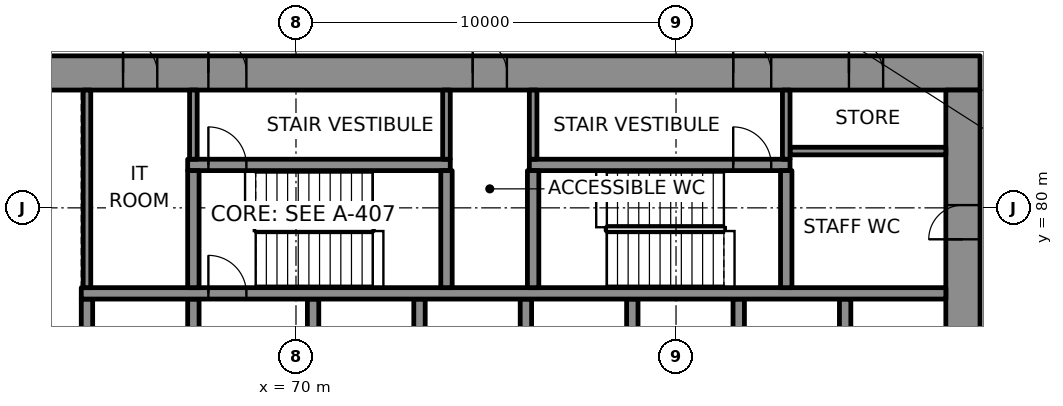
"""IFC4 building model, lengths in metres.
Left out: names, types, materials, properties, quantities, classifications, styles, units other than length and angle.
Written with IfcOpenShell. Run it as: python <this file> out.ifc"""

import sys

from ifc_helpers import new_model, si_unit, direction, frame, frame_2d, origin, place, context, subcontext, project, spatial, rectangle, extrude, element, fill, save


model = new_model("IFC4")
c1 = context("Model", 3, precision=1e-05, world=origin(), true_north=direction((0.0, 1.0)))
c2 = subcontext(c1, "Body", "Model", "MODEL_VIEW")
j1 = project(units=[si_unit("LENGTHUNIT", "METRE"), si_unit("PLANEANGLEUNIT", "RADIAN")], contexts=[c1])
p1 = place(None, origin())
s1 = spatial("IfcSite", under=j1, at=p1, CompositionType="ELEMENT")
p2 = place(p1, origin())
s2 = spatial("IfcBuilding", under=s1, at=p2, CompositionType="ELEMENT")
p3 = place(p2, frame((0.0, 0.0, 94.6)))
s3 = spatial("IfcBuildingStorey", under=s2, at=p3, CompositionType="ELEMENT", Elevation=94.6)
p4 = place(p3, frame((62.0, 83.55, 0.0), z_axis=(0.0, 0.0, 1.0), x_axis=(1.0, 0.0, 0.0)))
e1 = element("IfcWall", 1, at=p4, inside=s3, PredefinedType="SHEAR", context=c2, shape_type="SweptSolid", body=[
    extrude(rectangle(XDim=26.0, YDim=0.9, at=frame_2d((13.0, 0.0))), origin(), (0.0, 0.0, 1.0), 4.0),
])
p5 = place(p4, frame((5.695, 0.0, 0.0)))
e2 = element("IfcOpeningElement", 2, at=p5, cuts=e1, PredefinedType="OPENING", context=c2, shape_type="SweptSolid", body=[
    extrude(rectangle(XDim=1.0, YDim=2.1, at=frame_2d((0.5, 1.05))), frame((0.0, 0.46, 0.0), z_axis=(0.0, -1.0, 0.0), x_axis=(1.0, 0.0, 0.0)), (0.0, 0.0, 1.0), 0.92),
])
p6 = place(p4, frame((19.505, 0.0, 0.0)))
e3 = element("IfcOpeningElement", 3, at=p6, cuts=e1, PredefinedType="OPENING", context=c2, shape_type="SweptSolid", body=[
    extrude(rectangle(XDim=1.0, YDim=2.1, at=frame_2d((0.5, 1.05))), frame((0.0, 0.46, 0.0), z_axis=(0.0, -1.0, 0.0), x_axis=(1.0, 0.0, 0.0)), (0.0, 0.0, 1.0), 0.92),
])
p7 = place(p4, frame((3.45, 0.0, 0.0)))
e4 = element("IfcOpeningElement", 4, at=p7, cuts=e1, PredefinedType="OPENING", context=c2, shape_type="SweptSolid", body=[
    extrude(rectangle(XDim=0.9, YDim=2.1, at=frame_2d((0.45, 1.05))), frame((0.0, 0.46, 0.0), z_axis=(0.0, -1.0, 0.0), x_axis=(1.0, 0.0, 0.0)), (0.0, 0.0, 1.0), 0.92),
])
p8 = place(p4, frame((12.65, 0.0, 0.0)))
e5 = element("IfcOpeningElement", 5, at=p8, cuts=e1, PredefinedType="OPENING", context=c2, shape_type="SweptSolid", body=[
    extrude(rectangle(XDim=0.9, YDim=2.1, at=frame_2d((0.45, 1.05))), frame((0.0, 0.46, 0.0), z_axis=(0.0, -1.0, 0.0), x_axis=(1.0, 0.0, 0.0)), (0.0, 0.0, 1.0), 0.92),
])
p9 = place(p4, frame((22.55, 0.0, 0.0)))
e6 = element("IfcOpeningElement", 6, at=p9, cuts=e1, PredefinedType="OPENING", context=c2, shape_type="SweptSolid", body=[
    extrude(rectangle(XDim=0.9, YDim=2.1, at=frame_2d((0.45, 1.05))), frame((0.0, 0.46, 0.0), z_axis=(0.0, -1.0, 0.0), x_axis=(1.0, 0.0, 0.0)), (0.0, 0.0, 1.0), 0.92),
])
p10 = place(p3, frame((87.55, 66.9, 0.0), z_axis=(0.0, 0.0, 1.0), x_axis=(0.0, 1.0, 0.0)))
e7 = element("IfcWall", 7, at=p10, inside=s3, PredefinedType="SHEAR", context=c2, shape_type="SweptSolid", body=[
    extrude(rectangle(XDim=16.2, YDim=0.9, at=frame_2d((8.1, 0.0))), origin(), (0.0, 0.0, 1.0), 4.0),
])
p11 = place(p10, frame((5.5, 0.0, 0.0)))
e8 = element("IfcOpeningElement", 8, at=p11, cuts=e7, PredefinedType="OPENING", context=c2, shape_type="SweptSolid", body=[
    extrude(rectangle(XDim=1.8, YDim=2.1, at=frame_2d((0.9, 1.05))), frame((0.0, 0.46, 0.0), z_axis=(0.0, -1.0, 0.0), x_axis=(1.0, 0.0, 0.0)), (0.0, 0.0, 1.0), 0.92),
])
p12 = place(p10, frame((12.272, 0.0, 0.0)))
e9 = element("IfcOpeningElement", 9, at=p12, cuts=e7, PredefinedType="OPENING", context=c2, shape_type="SweptSolid", body=[
    extrude(rectangle(XDim=0.9, YDim=2.1, at=frame_2d((0.45, 1.05))), frame((0.0, 0.46, 0.0), z_axis=(0.0, -1.0, 0.0), x_axis=(1.0, 0.0, 0.0)), (0.0, 0.0, 1.0), 0.92),
])
for number, where, z_axis, x_axis in (
    (10, (64.5, 75.0, 0.0), (0.0, 0.0, 1.0), (0.0, 1.0, 0.0)),
    (11, (67.3, 75.0, 0.0), (0.0, 0.0, 1.0), (0.0, 1.0, 0.0)),
):
    element("IfcWall", number, at=place(p3, frame(where, z_axis=z_axis, x_axis=x_axis)), inside=s3, PredefinedType="SHEAR", context=c2, shape_type="SweptSolid", body=[
        extrude(rectangle(XDim=2.6, YDim=0.3, at=frame_2d((1.3, 0.0))), origin(), (0.0, 0.0, 1.0), 4.0),
    ])
p13 = place(p3, frame((70.45, 75.0, 0.0), z_axis=(0.0, 0.0, 1.0), x_axis=(0.0, 1.0, 0.0)))
e12 = element("IfcWall", 12, at=p13, inside=s3, PredefinedType="SHEAR", context=c2, shape_type="SweptSolid", body=[
    extrude(rectangle(XDim=2.6, YDim=0.3, at=frame_2d((1.3, 0.0))), origin(), (0.0, 0.0, 1.0), 4.0),
])
p14 = place(p13, frame((0.15, 0.0, 0.0)))
e13 = element("IfcOpeningElement", 13, at=p14, cuts=e12, PredefinedType="OPENING", context=c2, shape_type="SweptSolid", body=[
    extrude(rectangle(XDim=1.1, YDim=2.1, at=frame_2d((0.55, 1.05))), frame((0.0, 0.16, 0.0), z_axis=(0.0, -1.0, 0.0), x_axis=(1.0, 0.0, 0.0)), (0.0, 0.0, 1.0), 0.32),
])
for number, where, z_axis, x_axis in (
    (14, (73.25, 75.0, 0.0), (0.0, 0.0, 1.0), (0.0, 1.0, 0.0)),
    (15, (76.05, 75.0, 0.0), (0.0, 0.0, 1.0), (0.0, 1.0, 0.0)),
    (16, (78.85, 75.0, 0.0), (0.0, 0.0, 1.0), (0.0, 1.0, 0.0)),
    (17, (81.65, 75.0, 0.0), (0.0, 0.0, 1.0), (0.0, 1.0, 0.0)),
    (18, (84.45, 75.0, 0.0), (0.0, 0.0, 1.0), (0.0, 1.0, 0.0)),
):
    element("IfcWall", number, at=place(p3, frame(where, z_axis=z_axis, x_axis=x_axis)), inside=s3, PredefinedType="SHEAR", context=c2, shape_type="SweptSolid", body=[
        extrude(rectangle(XDim=2.6, YDim=0.3, at=frame_2d((1.3, 0.0))), origin(), (0.0, 0.0, 1.0), 4.0),
    ])
p15 = place(p3, frame((64.35, 77.75, 0.0), z_axis=(0.0, 0.0, 1.0), x_axis=(1.0, 0.0, 0.0)))
e19 = element("IfcWall", 19, at=p15, inside=s3, PredefinedType="SHEAR", context=c2, shape_type="SweptSolid", body=[
    extrude(rectangle(XDim=22.75, YDim=0.3, at=frame_2d((11.375, 0.0))), origin(), (0.0, 0.0, 1.0), 4.0),
])
p16 = place(p15, frame((3.345, 0.0, 0.0)))
e20 = element("IfcOpeningElement", 20, at=p16, cuts=e19, PredefinedType="OPENING", context=c2, shape_type="SweptSolid", body=[
    extrude(rectangle(XDim=1.0, YDim=2.1, at=frame_2d((0.5, 1.05))), frame((0.0, 0.16, 0.0), z_axis=(0.0, -1.0, 0.0), x_axis=(1.0, 0.0, 0.0)), (0.0, 0.0, 1.0), 0.32),
])
p17 = place(p3, frame((67.15, 81.13, 0.0), z_axis=(0.0, 0.0, 1.0), x_axis=(1.0, 0.0, 0.0)))
e21 = element("IfcWall", 21, at=p17, inside=s3, PredefinedType="SHEAR", context=c2, shape_type="SweptSolid", body=[
    extrude(rectangle(XDim=6.91, YDim=0.3, at=frame_2d((3.455, 0.0))), origin(), (0.0, 0.0, 1.0), 4.0),
])
p18 = place(p17, frame((0.545, 0.0, 0.0)))
e22 = element("IfcOpeningElement", 22, at=p18, cuts=e21, PredefinedType="OPENING", context=c2, shape_type="SweptSolid", body=[
    extrude(rectangle(XDim=1.0, YDim=2.1, at=frame_2d((0.5, 1.05))), frame((0.0, 0.16, 0.0), z_axis=(0.0, -1.0, 0.0), x_axis=(1.0, 0.0, 0.0)), (0.0, 0.0, 1.0), 0.32),
])
p19 = place(p3, frame((76.14, 81.13, 0.0), z_axis=(0.0, 0.0, 1.0), x_axis=(1.0, 0.0, 0.0)))
e23 = element("IfcWall", 23, at=p19, inside=s3, PredefinedType="SHEAR", context=c2, shape_type="SweptSolid", body=[
    extrude(rectangle(XDim=6.86, YDim=0.3, at=frame_2d((3.43, 0.0))), origin(), (0.0, 0.0, 1.0), 4.0),
])
p20 = place(p19, frame((5.365, 0.0, 0.0)))
e24 = element("IfcOpeningElement", 24, at=p20, cuts=e23, PredefinedType="OPENING", context=c2, shape_type="SweptSolid", body=[
    extrude(rectangle(XDim=1.0, YDim=2.1, at=frame_2d((0.5, 1.05))), frame((0.0, 0.16, 0.0), z_axis=(0.0, -1.0, 0.0), x_axis=(1.0, 0.0, 0.0)), (0.0, 0.0, 1.0), 0.32),
])
for number, where, z_axis, x_axis in (
    (25, (67.3, 77.9, 0.0), (0.0, 0.0, 1.0), (0.0, 1.0, 0.0)),
    (26, (73.96, 77.9, 0.0), (0.0, 0.0, 1.0), (0.0, 1.0, 0.0)),
    (27, (76.24, 77.9, 0.0), (0.0, 0.0, 1.0), (0.0, 1.0, 0.0)),
    (28, (82.9, 77.9, 0.0), (0.0, 0.0, 1.0), (0.0, 1.0, 0.0)),
):
    element("IfcWall", number, at=place(p3, frame(where, z_axis=z_axis, x_axis=x_axis)), inside=s3, PredefinedType="SHEAR", context=c2, shape_type="SweptSolid", body=[
        extrude(rectangle(XDim=3.08, YDim=0.3, at=frame_2d((1.54, 0.0))), origin(), (0.0, 0.0, 1.0), 4.0),
    ])
p21 = place(p3, frame((83.0, 81.495, 0.0), z_axis=(0.0, 0.0, 1.0), x_axis=(1.0, 0.0, 0.0)))
e29 = element("IfcWall", 29, at=p21, inside=s3, PredefinedType="PARTITIONING", context=c2, shape_type="SweptSolid", body=[
    extrude(rectangle(XDim=4.1, YDim=0.2, at=frame_2d((2.05, 0.0))), origin(), (0.0, 0.0, 1.0), 4.0),
])
p22 = place(p3, frame((64.5, 77.9, 0.0), z_axis=(0.0, 0.0, 1.0), x_axis=(0.0, 1.0, 0.0)))
e30 = element("IfcWall", 30, at=p22, inside=s3, PredefinedType="PARTITIONING", context=c2, shape_type="SweptSolid", body=[
    extrude(rectangle(XDim=5.2, YDim=0.2, at=frame_2d((2.6, 0.0))), origin(), (0.0, 0.0, 1.0), 4.0),
])
for number, where, z_axis, x_axis in (
    (31, (67.3, 81.28, 0.0), (0.0, 0.0, 1.0), (0.0, 1.0, 0.0)),
    (32, (73.96, 81.28, 0.0), (0.0, 0.0, 1.0), (0.0, 1.0, 0.0)),
    (33, (76.24, 81.28, 0.0), (0.0, 0.0, 1.0), (0.0, 1.0, 0.0)),
    (34, (82.9, 81.28, 0.0), (0.0, 0.0, 1.0), (0.0, 1.0, 0.0)),
):
    element("IfcWall", number, at=place(p3, frame(where, z_axis=z_axis, x_axis=x_axis)), inside=s3, PredefinedType="PARTITIONING", context=c2, shape_type="SweptSolid", body=[
        extrude(rectangle(XDim=1.82, YDim=0.2, at=frame_2d((0.91, 0.0))), origin(), (0.0, 0.0, 1.0), 4.0),
    ])
p23 = place(p16, origin())
e35 = element("IfcDoor", 35, at=p23, inside=s3, OperationType="SINGLE_SWING_LEFT", PredefinedType="DOOR", context=c2, shape_type="SweptSolid", body=[
    extrude(rectangle(XDim=1.0, YDim=2.1, at=frame_2d((0.5, 1.05))), frame((0.0, 0.025, 0.0), z_axis=(0.0, -1.0, 0.0), x_axis=(1.0, 0.0, 0.0)), (0.0, 0.0, 1.0), 0.05),
])
fill(e20, e35)
p24 = place(p18, origin())
e36 = element("IfcDoor", 36, at=p24, inside=s3, OperationType="SINGLE_SWING_RIGHT", PredefinedType="DOOR", context=c2, shape_type="SweptSolid", body=[
    extrude(rectangle(XDim=1.0, YDim=2.1, at=frame_2d((0.5, 1.05))), frame((0.0, 0.025, 0.0), z_axis=(0.0, -1.0, 0.0), x_axis=(1.0, 0.0, 0.0)), (0.0, 0.0, 1.0), 0.05),
])
fill(e22, e36)
p25 = place(p5, origin())
e37 = element("IfcDoor", 37, at=p25, inside=s3, OperationType="SINGLE_SWING_LEFT", PredefinedType="DOOR", context=c2, shape_type="SweptSolid", body=[
    extrude(rectangle(XDim=1.0, YDim=2.1, at=frame_2d((0.5, 1.05))), frame((0.0, 0.17, 0.0), z_axis=(0.0, -1.0, 0.0), x_axis=(1.0, 0.0, 0.0)), (0.0, 0.0, 1.0), 0.34),
])
fill(e2, e37)
p26 = place(p20, origin())
e38 = element("IfcDoor", 38, at=p26, inside=s3, OperationType="SINGLE_SWING_RIGHT", PredefinedType="DOOR", context=c2, shape_type="SweptSolid", body=[
    extrude(rectangle(XDim=1.0, YDim=2.1, at=frame_2d((0.5, 1.05))), frame((0.0, 0.025, 0.0), z_axis=(0.0, -1.0, 0.0), x_axis=(1.0, 0.0, 0.0)), (0.0, 0.0, 1.0), 0.05),
])
fill(e24, e38)
p27 = place(p6, origin())
e39 = element("IfcDoor", 39, at=p27, inside=s3, OperationType="SINGLE_SWING_LEFT", PredefinedType="DOOR", context=c2, shape_type="SweptSolid", body=[
    extrude(rectangle(XDim=1.0, YDim=2.1, at=frame_2d((0.5, 1.05))), frame((0.0, 0.17, 0.0), z_axis=(0.0, -1.0, 0.0), x_axis=(1.0, 0.0, 0.0)), (0.0, 0.0, 1.0), 0.34),
])
fill(e3, e39)
p28 = place(p7, origin())
e40 = element("IfcDoor", 40, at=p28, inside=s3, OperationType="SINGLE_SWING_RIGHT", PredefinedType="DOOR", context=c2, shape_type="SweptSolid", body=[
    extrude(rectangle(XDim=0.9, YDim=2.1, at=frame_2d((0.45, 1.05))), frame((0.0, 0.17, 0.0), z_axis=(0.0, -1.0, 0.0), x_axis=(1.0, 0.0, 0.0)), (0.0, 0.0, 1.0), 0.34),
])
fill(e4, e40)
p29 = place(p8, origin())
e41 = element("IfcDoor", 41, at=p29, inside=s3, OperationType="SINGLE_SWING_LEFT", PredefinedType="DOOR", context=c2, shape_type="SweptSolid", body=[
    extrude(rectangle(XDim=0.9, YDim=2.1, at=frame_2d((0.45, 1.05))), frame((0.0, 0.17, 0.0), z_axis=(0.0, -1.0, 0.0), x_axis=(1.0, 0.0, 0.0)), (0.0, 0.0, 1.0), 0.34),
])
fill(e5, e41)
p30 = place(p12, origin())
e42 = element("IfcDoor", 42, at=p30, inside=s3, OperationType="SINGLE_SWING_RIGHT", PredefinedType="DOOR", context=c2, shape_type="SweptSolid", body=[
    extrude(rectangle(XDim=0.9, YDim=2.1, at=frame_2d((0.45, 1.05))), frame((0.0, 0.17, 0.0), z_axis=(0.0, -1.0, 0.0), x_axis=(1.0, 0.0, 0.0)), (0.0, 0.0, 1.0), 0.34),
])
fill(e9, e42)
p31 = place(p9, origin())
e43 = element("IfcDoor", 43, at=p31, inside=s3, OperationType="SINGLE_SWING_LEFT", PredefinedType="DOOR", context=c2, shape_type="SweptSolid", body=[
    extrude(rectangle(XDim=0.9, YDim=2.1, at=frame_2d((0.45, 1.05))), frame((0.0, 0.17, 0.0), z_axis=(0.0, -1.0, 0.0), x_axis=(1.0, 0.0, 0.0)), (0.0, 0.0, 1.0), 0.34),
])
fill(e6, e43)
save(model, sys.argv[1])
